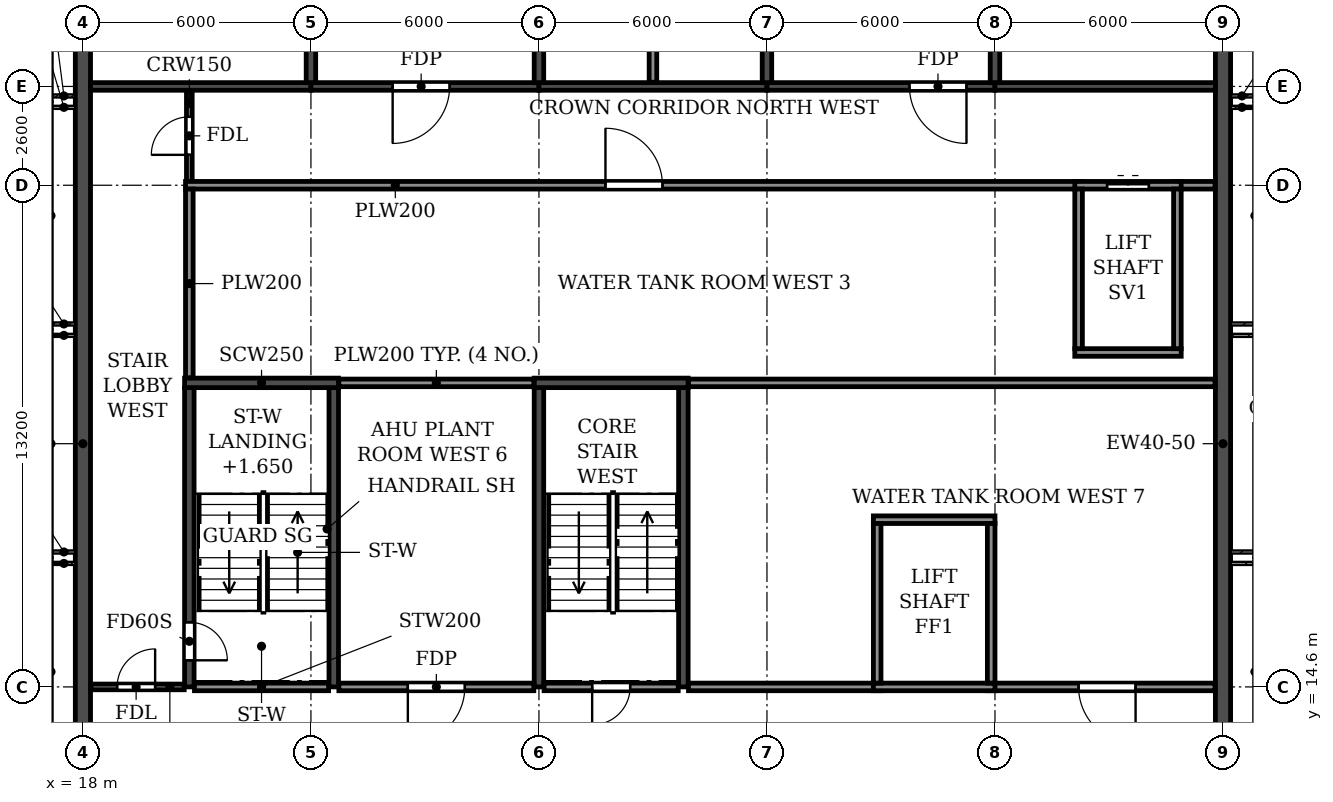
"""IFC4 building model, lengths in metres.
Left out: names, types, materials, properties, quantities, classifications, styles, units other than length and angle.
Written with IfcOpenShell. Run it as: python <this file> out.ifc"""

import sys

from ifc_helpers import new_model, si_unit, direction, frame, frame_2d, origin, place, context, subcontext, project, spatial, rectangle, extrude, element, fill, save


model = new_model("IFC4")
c1 = context("Model", 3, precision=1e-05, world=origin(), true_north=direction((0.0, 1.0)))
c2 = subcontext(c1, "Body", "Model", "MODEL_VIEW")
j1 = project(units=[si_unit("LENGTHUNIT", "METRE"), si_unit("PLANEANGLEUNIT", "RADIAN")], contexts=[c1])
p1 = place(None, origin())
s1 = spatial("IfcSite", under=j1, at=p1, CompositionType="ELEMENT")
p2 = place(p1, origin())
s2 = spatial("IfcBuilding", under=s1, at=p2, CompositionType="ELEMENT")
p3 = place(p2, frame((0.0, 0.0, 272.4)))
s3 = spatial("IfcBuildingStorey", under=s2, at=p3, CompositionType="ELEMENT", Elevation=272.4)
for number, where, z_axis, x_axis in (
    (1, (24.0, 30.5, 0.0), (0.0, 0.0, 1.0), (0.0, 1.0, 0.0)),
    (2, (30.0, 30.5, 0.0), (0.0, 0.0, 1.0), (0.0, 1.0, 0.0)),
    (3, (36.0, 30.5, 0.0), (0.0, 0.0, 1.0), (0.0, 1.0, 0.0)),
    (4, (42.0, 30.5, 0.0), (0.0, 0.0, 1.0), (0.0, 1.0, 0.0)),
):
    element("IfcWall", number, at=place(p3, frame(where, z_axis=z_axis, x_axis=x_axis)), inside=s3, PredefinedType="SHEAR", context=c2, shape_type="SweptSolid", body=[
        extrude(rectangle(XDim=10.5, YDim=0.25, at=frame_2d((5.25, 0.0))), origin(), (0.0, 0.0, 1.0), 3.05),
    ])
p4 = place(p3, frame((18.0, 4.683, 0.0), z_axis=(0.0, 0.0, 1.0), x_axis=(0.0, 1.0, 0.0)))
e5 = element("IfcWall", 5, at=p4, inside=s3, PredefinedType="SHEAR", context=c2, shape_type="SweptSolid", body=[
    extrude(rectangle(XDim=31.834, YDim=0.4, at=frame_2d((15.917, 0.0))), origin(), (0.0, 0.0, 1.0), 3.05),
])
p5 = place(p3, frame((48.0, 0.2, 0.0), z_axis=(0.0, 0.0, 1.0), x_axis=(0.0, 1.0, 0.0)))
e6 = element("IfcWall", 6, at=p5, inside=s3, PredefinedType="SHEAR", context=c2, shape_type="SweptSolid", body=[
    extrude(rectangle(XDim=40.8, YDim=0.4, at=frame_2d((20.4, 0.0))), origin(), (0.0, 0.0, 1.0), 3.05),
])
p6 = place(p3, frame((18.2, 30.4, 0.0), z_axis=(0.0, 0.0, 1.0), x_axis=(1.0, 0.0, 0.0)))
e7 = element("IfcWall", 7, at=p6, inside=s3, PredefinedType="SHEAR", context=c2, shape_type="SweptSolid", body=[
    extrude(rectangle(XDim=5.8, YDim=0.2, at=frame_2d((2.9, 0.0))), origin(), (0.0, 0.0, 1.0), 2.45),
])
p7 = place(p3, frame((24.0, 30.4, 0.0), z_axis=(0.0, 0.0, 1.0), x_axis=(1.0, 0.0, 0.0)))
e8 = element("IfcWall", 8, at=p7, inside=s3, PredefinedType="SHEAR", context=c2, shape_type="SweptSolid", body=[
    extrude(rectangle(XDim=6.0, YDim=0.2, at=frame_2d((3.0, 0.0))), origin(), (0.0, 0.0, 1.0), 2.45),
])
p8 = place(p7, frame((2.15, 0.0, 0.0)))
e9 = element("IfcOpeningElement", 9, at=p8, cuts=e8, PredefinedType="OPENING", context=c2, shape_type="SweptSolid", body=[
    extrude(rectangle(XDim=1.5, YDim=2.1, at=frame_2d((0.75, 1.05))), frame((0.0, 0.11, 0.0), z_axis=(0.0, -1.0, 0.0), x_axis=(1.0, 0.0, 0.0)), (0.0, 0.0, 1.0), 0.22),
])
p9 = place(p3, frame((30.0, 30.4, 0.0), z_axis=(0.0, 0.0, 1.0), x_axis=(1.0, 0.0, 0.0)))
e10 = element("IfcWall", 10, at=p9, inside=s3, PredefinedType="SHEAR", context=c2, shape_type="SweptSolid", body=[
    extrude(rectangle(XDim=6.0, YDim=0.2, at=frame_2d((3.0, 0.0))), origin(), (0.0, 0.0, 1.0), 2.45),
])
p10 = place(p3, frame((36.0, 30.4, 0.0), z_axis=(0.0, 0.0, 1.0), x_axis=(1.0, 0.0, 0.0)))
e11 = element("IfcWall", 11, at=p10, inside=s3, PredefinedType="SHEAR", context=c2, shape_type="SweptSolid", body=[
    extrude(rectangle(XDim=6.0, YDim=0.2, at=frame_2d((3.0, 0.0))), origin(), (0.0, 0.0, 1.0), 2.45),
])
p11 = place(p10, frame((3.75, 0.0, 0.0)))
e12 = element("IfcOpeningElement", 12, at=p11, cuts=e11, PredefinedType="OPENING", context=c2, shape_type="SweptSolid", body=[
    extrude(rectangle(XDim=1.5, YDim=2.1, at=frame_2d((0.75, 1.05))), frame((0.0, 0.11, 0.0), z_axis=(0.0, -1.0, 0.0), x_axis=(1.0, 0.0, 0.0)), (0.0, 0.0, 1.0), 0.22),
])
p12 = place(p3, frame((42.0, 30.4, 0.0), z_axis=(0.0, 0.0, 1.0), x_axis=(1.0, 0.0, 0.0)))
e13 = element("IfcWall", 13, at=p12, inside=s3, PredefinedType="SHEAR", context=c2, shape_type="SweptSolid", body=[
    extrude(rectangle(XDim=5.8, YDim=0.2, at=frame_2d((2.9, 0.0))), origin(), (0.0, 0.0, 1.0), 2.45),
])
p13 = place(p3, frame((20.8, 14.6, 0.0), z_axis=(0.0, 0.0, 1.0), x_axis=(0.0, 1.0, 0.0)))
e14 = element("IfcWall", 14, at=p13, inside=s3, PredefinedType="SOLIDWALL", context=c2, shape_type="SweptSolid", body=[
    extrude(rectangle(XDim=7.875, YDim=0.25, at=frame_2d((3.938, 0.0))), origin(), (0.0, 0.0, 1.0), 3.05),
])
p14 = place(p13, frame((0.7, 0.0, 0.0)))
e15 = element("IfcOpeningElement", 15, at=p14, cuts=e14, PredefinedType="OPENING", context=c2, shape_type="SweptSolid", body=[
    extrude(rectangle(XDim=1.0, YDim=2.1, at=frame_2d((0.5, 1.05))), frame((0.0, 0.135, 0.0), z_axis=(0.0, -1.0, 0.0), x_axis=(1.0, 0.0, 0.0)), (0.0, 0.0, 1.0), 0.27),
])
p15 = place(p3, frame((24.6, 14.6, 0.0), z_axis=(0.0, 0.0, 1.0), x_axis=(0.0, 1.0, 0.0)))
e16 = element("IfcWall", 16, at=p15, inside=s3, PredefinedType="SOLIDWALL", context=c2, shape_type="SweptSolid", body=[
    extrude(rectangle(XDim=7.875, YDim=0.25, at=frame_2d((3.938, 0.0))), origin(), (0.0, 0.0, 1.0), 3.05),
])
p16 = place(p3, frame((20.675, 22.6, 0.0), z_axis=(0.0, 0.0, 1.0), x_axis=(1.0, 0.0, 0.0)))
e17 = element("IfcWall", 17, at=p16, inside=s3, PredefinedType="SOLIDWALL", context=c2, shape_type="SweptSolid", body=[
    extrude(rectangle(XDim=4.05, YDim=0.25, at=frame_2d((2.025, 0.0))), origin(), (0.0, 0.0, 1.0), 3.05),
])
for number, where, z_axis, x_axis in (
    (18, (30.0, 14.6, 0.0), (0.0, 0.0, 1.0), (0.0, 1.0, 0.0)),
    (19, (33.8, 14.6, 0.0), (0.0, 0.0, 1.0), (0.0, 1.0, 0.0)),
):
    element("IfcWall", number, at=place(p3, frame(where, z_axis=z_axis, x_axis=x_axis)), inside=s3, PredefinedType="SOLIDWALL", context=c2, shape_type="SweptSolid", body=[
        extrude(rectangle(XDim=7.875, YDim=0.25, at=frame_2d((3.938, 0.0))), origin(), (0.0, 0.0, 1.0), 3.05),
    ])
p17 = place(p3, frame((29.875, 22.6, 0.0), z_axis=(0.0, 0.0, 1.0), x_axis=(1.0, 0.0, 0.0)))
e20 = element("IfcWall", 20, at=p17, inside=s3, PredefinedType="SOLIDWALL", context=c2, shape_type="SweptSolid", body=[
    extrude(rectangle(XDim=4.05, YDim=0.25, at=frame_2d((2.025, 0.0))), origin(), (0.0, 0.0, 1.0), 3.05),
])
p18 = place(p3, frame((18.21, 14.6, 0.0), z_axis=(0.0, 0.0, 1.0), x_axis=(1.0, 0.0, 0.0)))
e21 = element("IfcWall", 21, at=p18, inside=s3, PredefinedType="PARTITIONING", context=c2, shape_type="SweptSolid", body=[
    extrude(rectangle(XDim=2.455, YDim=0.15, at=frame_2d((1.228, 0.0))), origin(), (0.0, 0.0, 1.0), 3.05),
])
p19 = place(p18, frame((0.69, 0.0, 0.0)))
e22 = element("IfcOpeningElement", 22, at=p19, cuts=e21, PredefinedType="OPENING", context=c2, shape_type="SweptSolid", body=[
    extrude(rectangle(XDim=1.0, YDim=2.1, at=frame_2d((0.5, 1.05))), frame((0.0, 0.085, 0.0), z_axis=(0.0, -1.0, 0.0), x_axis=(1.0, 0.0, 0.0)), (0.0, 0.0, 1.0), 0.17),
])
p20 = place(p3, frame((20.8, 27.9, 0.0), z_axis=(0.0, 0.0, 1.0), x_axis=(0.0, 1.0, 0.0)))
e23 = element("IfcWall", 23, at=p20, inside=s3, PredefinedType="PARTITIONING", context=c2, shape_type="SweptSolid", body=[
    extrude(rectangle(XDim=2.39, YDim=0.15, at=frame_2d((1.195, 0.0))), origin(), (0.0, 0.0, 1.0), 3.05),
])
p21 = place(p20, frame((0.7, 0.0, 0.0)))
e24 = element("IfcOpeningElement", 24, at=p21, cuts=e23, PredefinedType="OPENING", context=c2, shape_type="SweptSolid", body=[
    extrude(rectangle(XDim=1.0, YDim=2.1, at=frame_2d((0.5, 1.05))), frame((0.0, 0.085, 0.0), z_axis=(0.0, -1.0, 0.0), x_axis=(1.0, 0.0, 0.0)), (0.0, 0.0, 1.0), 0.17),
])
p22 = place(p3, frame((24.735, 14.6, 0.0), z_axis=(0.0, 0.0, 1.0), x_axis=(1.0, 0.0, 0.0)))
e25 = element("IfcWall", 25, at=p22, inside=s3, PredefinedType="PARTITIONING", context=c2, shape_type="SweptSolid", body=[
    extrude(rectangle(XDim=5.13, YDim=0.2, at=frame_2d((2.565, 0.0))), origin(), (0.0, 0.0, 1.0), 3.05),
])
p23 = place(p22, frame((1.815, 0.0, 0.0)))
e26 = element("IfcOpeningElement", 26, at=p23, cuts=e25, PredefinedType="OPENING", context=c2, shape_type="SweptSolid", body=[
    extrude(rectangle(XDim=1.5, YDim=2.1, at=frame_2d((0.75, 1.05))), frame((0.0, 0.11, 0.0), z_axis=(0.0, -1.0, 0.0), x_axis=(1.0, 0.0, 0.0)), (0.0, 0.0, 1.0), 0.22),
])
p24 = place(p3, frame((33.935, 14.6, 0.0), z_axis=(0.0, 0.0, 1.0), x_axis=(1.0, 0.0, 0.0)))
e27 = element("IfcWall", 27, at=p24, inside=s3, PredefinedType="PARTITIONING", context=c2, shape_type="SweptSolid", body=[
    extrude(rectangle(XDim=5.065, YDim=0.2, at=frame_2d((2.532, 0.0))), origin(), (0.0, 0.0, 1.0), 3.05),
])
p25 = place(p3, frame((41.8, 14.6, 0.0), z_axis=(0.0, 0.0, 1.0), x_axis=(1.0, 0.0, 0.0)))
e28 = element("IfcWall", 28, at=p25, inside=s3, PredefinedType="PARTITIONING", context=c2, shape_type="SweptSolid", body=[
    extrude(rectangle(XDim=5.99, YDim=0.2, at=frame_2d((2.995, 0.0))), origin(), (0.0, 0.0, 1.0), 3.05),
])
p26 = place(p25, frame((2.4, 0.0, 0.0)))
e29 = element("IfcOpeningElement", 29, at=p26, cuts=e28, PredefinedType="OPENING", context=c2, shape_type="SweptSolid", body=[
    extrude(rectangle(XDim=1.5, YDim=2.1, at=frame_2d((0.75, 1.05))), frame((0.0, 0.11, 0.0), z_axis=(0.0, -1.0, 0.0), x_axis=(1.0, 0.0, 0.0)), (0.0, 0.0, 1.0), 0.22),
])
p27 = place(p3, frame((24.735, 22.6, 0.0), z_axis=(0.0, 0.0, 1.0), x_axis=(1.0, 0.0, 0.0)))
e30 = element("IfcWall", 30, at=p27, inside=s3, PredefinedType="PARTITIONING", context=c2, shape_type="SweptSolid", body=[
    extrude(rectangle(XDim=5.13, YDim=0.2, at=frame_2d((2.565, 0.0))), origin(), (0.0, 0.0, 1.0), 3.05),
])
p28 = place(p3, frame((33.935, 22.6, 0.0), z_axis=(0.0, 0.0, 1.0), x_axis=(1.0, 0.0, 0.0)))
e31 = element("IfcWall", 31, at=p28, inside=s3, PredefinedType="PARTITIONING", context=c2, shape_type="SweptSolid", body=[
    extrude(rectangle(XDim=13.855, YDim=0.2, at=frame_2d((6.927, 0.0))), origin(), (0.0, 0.0, 1.0), 3.05),
])
p29 = place(p3, frame((20.7, 27.8, 0.0), z_axis=(0.0, 0.0, 1.0), x_axis=(1.0, 0.0, 0.0)))
e32 = element("IfcWall", 32, at=p29, inside=s3, PredefinedType="PARTITIONING", context=c2, shape_type="SweptSolid", body=[
    extrude(rectangle(XDim=23.6, YDim=0.2, at=frame_2d((11.8, 0.0))), origin(), (0.0, 0.0, 1.0), 3.05),
])
p30 = place(p29, frame((11.05, 0.0, 0.0)))
e33 = element("IfcOpeningElement", 33, at=p30, cuts=e32, PredefinedType="OPENING", context=c2, shape_type="SweptSolid", body=[
    extrude(rectangle(XDim=1.5, YDim=2.1, at=frame_2d((0.75, 1.05))), frame((0.0, 0.11, 0.0), z_axis=(0.0, -1.0, 0.0), x_axis=(1.0, 0.0, 0.0)), (0.0, 0.0, 1.0), 0.22),
])
p31 = place(p3, frame((46.7, 27.8, 0.0), z_axis=(0.0, 0.0, 1.0), x_axis=(1.0, 0.0, 0.0)))
e34 = element("IfcWall", 34, at=p31, inside=s3, PredefinedType="PARTITIONING", context=c2, shape_type="SweptSolid", body=[
    extrude(rectangle(XDim=1.09, YDim=0.2, at=frame_2d((0.545, 0.0))), origin(), (0.0, 0.0, 1.0), 3.05),
])
p32 = place(p3, frame((20.8, 22.735, 0.0), z_axis=(0.0, 0.0, 1.0), x_axis=(0.0, 1.0, 0.0)))
e35 = element("IfcWall", 35, at=p32, inside=s3, PredefinedType="PARTITIONING", context=c2, shape_type="SweptSolid", body=[
    extrude(rectangle(XDim=4.965, YDim=0.2, at=frame_2d((2.482, 0.0))), origin(), (0.0, 0.0, 1.0), 3.05),
])
p33 = place(p3, frame((33.0, 30.51, 0.0), z_axis=(0.0, 0.0, 1.0), x_axis=(0.0, 1.0, 0.0)))
e36 = element("IfcWall", 36, at=p33, inside=s3, PredefinedType="PARTITIONING", context=c2, shape_type="SweptSolid", body=[
    extrude(rectangle(XDim=10.63, YDim=0.2, at=frame_2d((5.315, 0.0))), origin(), (0.0, 0.0, 1.0), 3.05),
])
for number, where, z_axis, x_axis in (
    (37, (38.8, 14.6, 0.0), (0.0, 0.0, 1.0), (1.0, 0.0, 0.0)),
    (38, (38.8, 19.0, 0.0), (0.0, 0.0, 1.0), (1.0, 0.0, 0.0)),
):
    element("IfcWall", number, at=place(p3, frame(where, z_axis=z_axis, x_axis=x_axis)), inside=s3, PredefinedType="PARTITIONING", context=c2, shape_type="SweptSolid", body=[
        extrude(rectangle(XDim=3.2, YDim=0.2, at=frame_2d((1.6, 0.0))), origin(), (0.0, 0.0, 1.0), 3.05),
    ])
p34 = place(p3, frame((44.1, 23.4, 0.0), z_axis=(0.0, 0.0, 1.0), x_axis=(1.0, 0.0, 0.0)))
e39 = element("IfcWall", 39, at=p34, inside=s3, PredefinedType="PARTITIONING", context=c2, shape_type="SweptSolid", body=[
    extrude(rectangle(XDim=2.8, YDim=0.2, at=frame_2d((1.4, 0.0))), origin(), (0.0, 0.0, 1.0), 3.05),
])
p35 = place(p3, frame((44.1, 27.8, 0.0), z_axis=(0.0, 0.0, 1.0), x_axis=(1.0, 0.0, 0.0)))
e40 = element("IfcWall", 40, at=p35, inside=s3, PredefinedType="PARTITIONING", context=c2, shape_type="SweptSolid", body=[
    extrude(rectangle(XDim=2.8, YDim=0.2, at=frame_2d((1.4, 0.0))), origin(), (0.0, 0.0, 1.0), 3.05),
])
p36 = place(p35, frame((0.85, 0.0, 0.0)))
e41 = element("IfcOpeningElement", 41, at=p36, cuts=e40, PredefinedType="OPENING", context=c2, shape_type="SweptSolid", body=[
    extrude(rectangle(XDim=1.1, YDim=2.1, at=frame_2d((0.55, 1.05))), frame((0.0, 0.11, 0.0), z_axis=(0.0, -1.0, 0.0), x_axis=(1.0, 0.0, 0.0)), (0.0, 0.0, 1.0), 0.22),
])
for number, where, z_axis, x_axis in (
    (42, (38.9, 14.7, 0.0), (0.0, 0.0, 1.0), (0.0, 1.0, 0.0)),
    (43, (41.9, 14.7, 0.0), (0.0, 0.0, 1.0), (0.0, 1.0, 0.0)),
    (44, (44.2, 23.5, 0.0), (0.0, 0.0, 1.0), (0.0, 1.0, 0.0)),
    (45, (46.8, 23.5, 0.0), (0.0, 0.0, 1.0), (0.0, 1.0, 0.0)),
):
    element("IfcWall", number, at=place(p3, frame(where, z_axis=z_axis, x_axis=x_axis)), inside=s3, PredefinedType="PARTITIONING", context=c2, shape_type="SweptSolid", body=[
        extrude(rectangle(XDim=4.2, YDim=0.2, at=frame_2d((2.1, 0.0))), origin(), (0.0, 0.0, 1.0), 3.05),
    ])
p37 = place(p3, frame((20.935, 14.6, 0.0), z_axis=(0.0, 0.0, 1.0), x_axis=(1.0, 0.0, 0.0)))
e46 = element("IfcWall", 46, at=p37, inside=s3, PredefinedType="PARTITIONING", context=c2, shape_type="SweptSolid", body=[
    extrude(rectangle(XDim=3.53, YDim=0.2, at=frame_2d((1.765, 0.0))), origin(), (0.0, 0.0, 1.0), 3.05),
])
p38 = place(p3, frame((30.135, 14.6, 0.0), z_axis=(0.0, 0.0, 1.0), x_axis=(1.0, 0.0, 0.0)))
e47 = element("IfcWall", 47, at=p38, inside=s3, PredefinedType="PARTITIONING", context=c2, shape_type="SweptSolid", body=[
    extrude(rectangle(XDim=3.53, YDim=0.2, at=frame_2d((1.765, 0.0))), origin(), (0.0, 0.0, 1.0), 3.05),
])
p39 = place(p38, frame((1.265, 0.0, 0.0)))
e48 = element("IfcOpeningElement", 48, at=p39, cuts=e47, PredefinedType="OPENING", context=c2, shape_type="SweptSolid", body=[
    extrude(rectangle(XDim=1.0, YDim=2.1, at=frame_2d((0.5, 1.05))), frame((0.0, 0.11, 0.0), z_axis=(0.0, -1.0, 0.0), x_axis=(1.0, 0.0, 0.0)), (0.0, 0.0, 1.0), 0.22),
])
p40 = place(p8, frame((1.5, 0.0, 0.0), z_axis=(0.0, 0.0, 1.0), x_axis=(-1.0, 0.0, 0.0)))
e49 = element("IfcDoor", 49, at=p40, inside=s3, OperationType="DOUBLE_DOOR_SINGLE_SWING", PredefinedType="DOOR", context=c2, shape_type="SweptSolid", body=[
    extrude(rectangle(XDim=1.5, YDim=2.1, at=frame_2d((0.75, 1.05))), frame((0.0, 0.025, 0.0), z_axis=(0.0, -1.0, 0.0), x_axis=(1.0, 0.0, 0.0)), (0.0, 0.0, 1.0), 0.05),
])
fill(e9, e49)
p41 = place(p30, origin())
e50 = element("IfcDoor", 50, at=p41, inside=s3, OperationType="DOUBLE_DOOR_SINGLE_SWING", PredefinedType="DOOR", context=c2, shape_type="SweptSolid", body=[
    extrude(rectangle(XDim=1.5, YDim=2.1, at=frame_2d((0.75, 1.05))), frame((0.0, 0.025, 0.0), z_axis=(0.0, -1.0, 0.0), x_axis=(1.0, 0.0, 0.0)), (0.0, 0.0, 1.0), 0.05),
])
fill(e33, e50)
p42 = place(p11, frame((1.5, 0.0, 0.0), z_axis=(0.0, 0.0, 1.0), x_axis=(-1.0, 0.0, 0.0)))
e51 = element("IfcDoor", 51, at=p42, inside=s3, OperationType="DOUBLE_DOOR_SINGLE_SWING", PredefinedType="DOOR", context=c2, shape_type="SweptSolid", body=[
    extrude(rectangle(XDim=1.5, YDim=2.1, at=frame_2d((0.75, 1.05))), frame((0.0, 0.025, 0.0), z_axis=(0.0, -1.0, 0.0), x_axis=(1.0, 0.0, 0.0)), (0.0, 0.0, 1.0), 0.05),
])
fill(e12, e51)
p43 = place(p36, origin())
e52 = element("IfcDoor", 52, at=p43, inside=s3, OperationType="DOUBLE_DOOR_SLIDING", PredefinedType="DOOR", context=c2, shape_type="SweptSolid", body=[
    extrude(rectangle(XDim=1.1, YDim=2.1, at=frame_2d((0.55, 1.05))), frame((0.0, 0.025, 0.0), z_axis=(0.0, -1.0, 0.0), x_axis=(1.0, 0.0, 0.0)), (0.0, 0.0, 1.0), 0.05),
])
fill(e41, e52)
p44 = place(p23, frame((1.5, 0.0, 0.0), z_axis=(0.0, 0.0, 1.0), x_axis=(-1.0, 0.0, 0.0)))
e53 = element("IfcDoor", 53, at=p44, inside=s3, OperationType="DOUBLE_DOOR_SINGLE_SWING", PredefinedType="DOOR", context=c2, shape_type="SweptSolid", body=[
    extrude(rectangle(XDim=1.5, YDim=2.1, at=frame_2d((0.75, 1.05))), frame((0.0, 0.025, 0.0), z_axis=(0.0, -1.0, 0.0), x_axis=(1.0, 0.0, 0.0)), (0.0, 0.0, 1.0), 0.05),
])
fill(e26, e53)
p45 = place(p26, frame((1.5, 0.0, 0.0), z_axis=(0.0, 0.0, 1.0), x_axis=(-1.0, 0.0, 0.0)))
e54 = element("IfcDoor", 54, at=p45, inside=s3, OperationType="DOUBLE_DOOR_SINGLE_SWING", PredefinedType="DOOR", context=c2, shape_type="SweptSolid", body=[
    extrude(rectangle(XDim=1.5, YDim=2.1, at=frame_2d((0.75, 1.05))), frame((0.0, 0.025, 0.0), z_axis=(0.0, -1.0, 0.0), x_axis=(1.0, 0.0, 0.0)), (0.0, 0.0, 1.0), 0.05),
])
fill(e29, e54)
p46 = place(p19, origin())
e55 = element("IfcDoor", 55, at=p46, inside=s3, OperationType="SINGLE_SWING_RIGHT", PredefinedType="DOOR", context=c2, shape_type="SweptSolid", body=[
    extrude(rectangle(XDim=1.0, YDim=2.1, at=frame_2d((0.5, 1.05))), frame((0.0, 0.025, 0.0), z_axis=(0.0, -1.0, 0.0), x_axis=(1.0, 0.0, 0.0)), (0.0, 0.0, 1.0), 0.05),
])
fill(e22, e55)
p47 = place(p14, frame((1.0, 0.0, 0.0), z_axis=(0.0, 0.0, 1.0), x_axis=(-1.0, 0.0, 0.0)))
e56 = element("IfcDoor", 56, at=p47, inside=s3, OperationType="SINGLE_SWING_RIGHT", PredefinedType="DOOR", context=c2, shape_type="SweptSolid", body=[
    extrude(rectangle(XDim=1.0, YDim=2.1, at=frame_2d((0.5, 1.05))), frame((0.0, 0.025, 0.0), z_axis=(0.0, -1.0, 0.0), x_axis=(1.0, 0.0, 0.0)), (0.0, 0.0, 1.0), 0.05),
])
fill(e15, e56)
p48 = place(p21, origin())
e57 = element("IfcDoor", 57, at=p48, inside=s3, OperationType="SINGLE_SWING_LEFT", PredefinedType="DOOR", context=c2, shape_type="SweptSolid", body=[
    extrude(rectangle(XDim=1.0, YDim=2.1, at=frame_2d((0.5, 1.05))), frame((0.0, 0.025, 0.0), z_axis=(0.0, -1.0, 0.0), x_axis=(1.0, 0.0, 0.0)), (0.0, 0.0, 1.0), 0.05),
])
fill(e24, e57)
p49 = place(p39, frame((1.0, 0.0, 0.0), z_axis=(0.0, 0.0, 1.0), x_axis=(-1.0, 0.0, 0.0)))
e58 = element("IfcDoor", 58, at=p49, inside=s3, OperationType="SINGLE_SWING_RIGHT", PredefinedType="DOOR", context=c2, shape_type="SweptSolid", body=[
    extrude(rectangle(XDim=1.0, YDim=2.1, at=frame_2d((0.5, 1.05))), frame((0.0, 0.025, 0.0), z_axis=(0.0, -1.0, 0.0), x_axis=(1.0, 0.0, 0.0)), (0.0, 0.0, 1.0), 0.05),
])
fill(e48, e58)
save(model, sys.argv[1])
